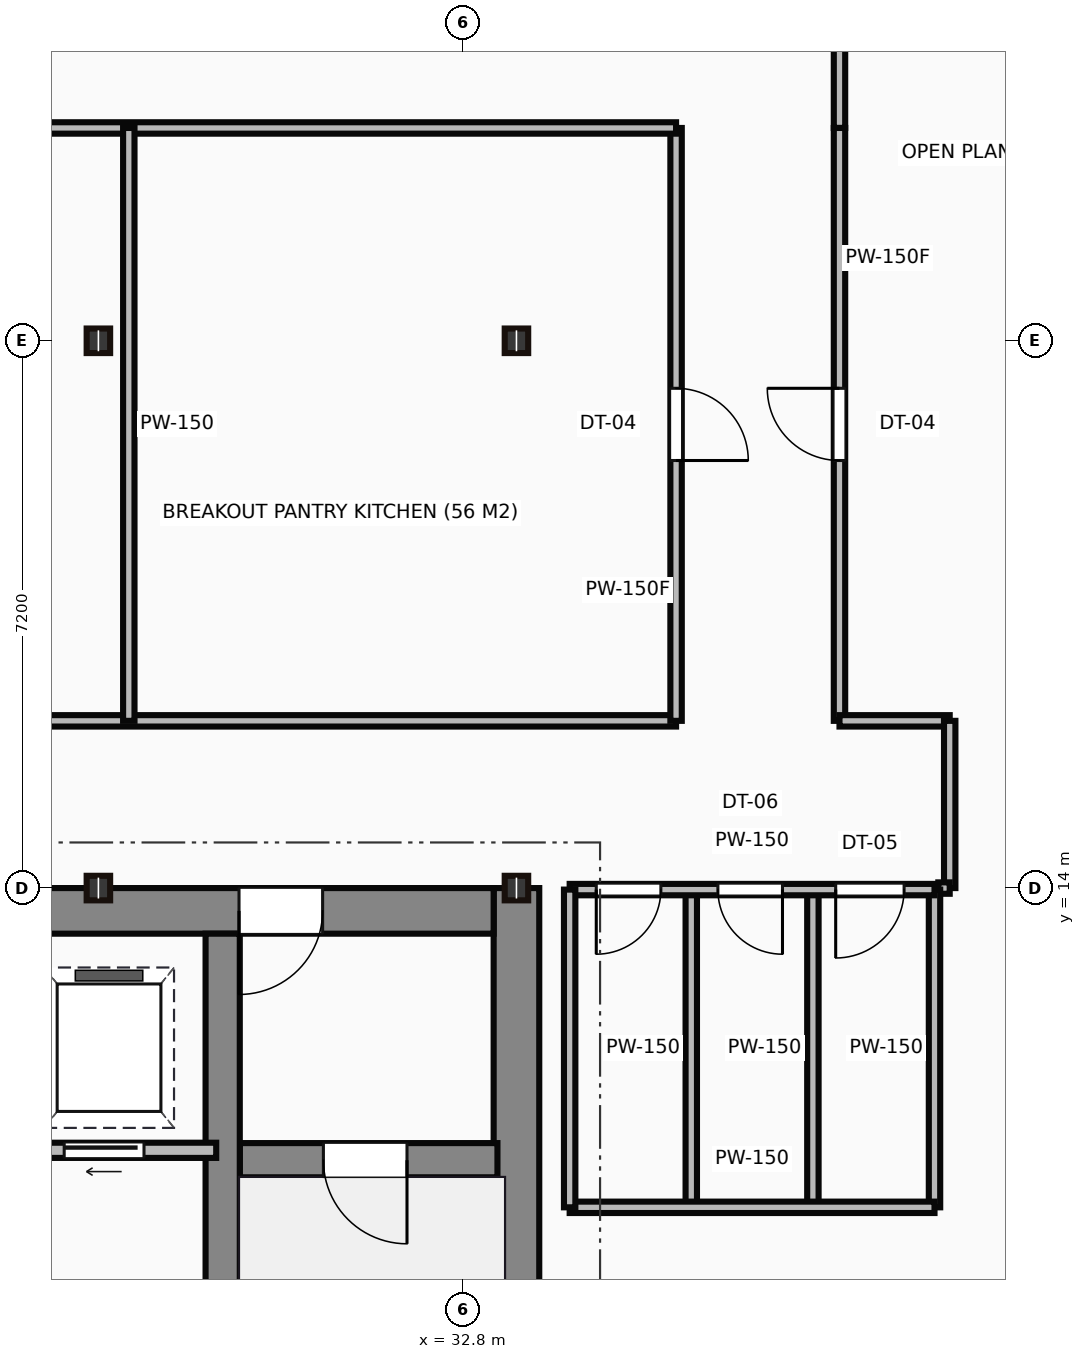
"""IFC4 building model, lengths in metres.
Left out: names, types, materials, properties, quantities, classifications, styles, units other than length and angle.
Written with IfcOpenShell. Run it as: python <this file> out.ifc"""

import sys

from ifc_helpers import new_model, si_unit, direction, frame, frame_2d, origin, origin_2d, place, context, subcontext, project, spatial, rectangle, i_section, extrude, source, transform, mapped, element, fill, save


model = new_model("IFC4")
c1 = context("Model", 3, precision=1e-05, world=origin(), true_north=direction((0.0, 1.0)))
c2 = subcontext(c1, "Body", "Model", "MODEL_VIEW")
j1 = project(units=[si_unit("LENGTHUNIT", "METRE"), si_unit("PLANEANGLEUNIT", "RADIAN")], contexts=[c1])
p1 = place(None, origin())
s1 = spatial("IfcSite", under=j1, at=p1, CompositionType="ELEMENT")
p2 = place(p1, origin())
s2 = spatial("IfcBuilding", under=s1, at=p2, CompositionType="ELEMENT")
p3 = place(p2, frame((0.0, 0.0, 266.1)))
s3 = spatial("IfcBuildingStorey", under=s2, at=p3, CompositionType="ELEMENT", Elevation=266.1)
m1 = source(origin(), c2, "Body", "SweptSolid", [
    extrude(rectangle(XDim=13.1, YDim=0.6, at=frame_2d((6.55, 0.0))), origin(), (0.0, 0.0, 1.0), 3.65),
])
p4 = place(p3, frame((33.5, 0.9, 0.0), z_axis=(0.0, 0.0, 1.0), x_axis=(0.0, 1.0, 0.0)))
e1 = element("IfcWall", 1, at=p4, inside=s3, PredefinedType="SHEAR", context=c2, shape_type="MappedRepresentation", body=[
    mapped(m1, transform((0.0, 0.0, 0.0))),
])
m2 = source(origin(), c2, "Body", "SweptSolid", [
    extrude(rectangle(XDim=12.6, YDim=0.6, at=frame_2d((6.3, 0.0))), origin(), (0.0, 0.0, 1.0), 3.65),
])
p5 = place(p3, frame((20.6, 13.7, 0.0), z_axis=(0.0, 0.0, 1.0), x_axis=(1.0, 0.0, 0.0)))
e2 = element("IfcWall", 2, at=p5, inside=s3, PredefinedType="SHEAR", context=c2, shape_type="MappedRepresentation", body=[
    mapped(m2, transform((0.0, 0.0, 0.0))),
])
p6 = place(p5, frame((9.25, 0.0, 0.0)))
e3 = element("IfcOpeningElement", 3, at=p6, cuts=e2, PredefinedType="OPENING", context=c2, shape_type="SweptSolid", body=[
    extrude(rectangle(XDim=1.1, YDim=2.15, at=frame_2d((0.55, 1.075))), frame((0.0, 0.31, 0.0), z_axis=(0.0, -1.0, 0.0), x_axis=(1.0, 0.0, 0.0)), (0.0, 0.0, 1.0), 0.62),
])
m3 = source(origin(), c2, "Body", "SweptSolid", [
    extrude(rectangle(XDim=12.5, YDim=0.45, at=frame_2d((6.25, 0.0))), origin(), (0.0, 0.0, 1.0), 3.65),
])
p7 = place(p3, frame((29.635, 0.9, 0.0), z_axis=(0.0, 0.0, 1.0), x_axis=(0.0, 1.0, 0.0)))
e4 = element("IfcWall", 4, at=p7, inside=s3, PredefinedType="SHEAR", context=c2, shape_type="MappedRepresentation", body=[
    mapped(m3, transform((0.0, 0.0, 0.0))),
])
m4 = source(origin(), c2, "Body", "SweptSolid", [
    extrude(rectangle(XDim=3.39, YDim=0.45, at=frame_2d((1.695, 0.0))), origin(), (0.0, 0.0, 1.0), 3.65),
])
p8 = place(p3, frame((29.86, 10.42, 0.0), z_axis=(0.0, 0.0, 1.0), x_axis=(1.0, 0.0, 0.0)))
e5 = element("IfcWall", 5, at=p8, inside=s3, PredefinedType="SHEAR", context=c2, shape_type="MappedRepresentation", body=[
    mapped(m4, transform((0.0, 0.0, 0.0))),
])
p9 = place(p8, frame((1.1, 0.0, 0.0)))
e6 = element("IfcOpeningElement", 6, at=p9, cuts=e5, PredefinedType="OPENING", context=c2, shape_type="SweptSolid", body=[
    extrude(rectangle(XDim=1.1, YDim=2.15, at=frame_2d((0.55, 1.075))), frame((0.0, 0.235, 0.0), z_axis=(0.0, -1.0, 0.0), x_axis=(1.0, 0.0, 0.0)), (0.0, 0.0, 1.0), 0.47),
])
m5 = source(origin(), c2, "Body", "SweptSolid", [
    extrude(i_section(OverallWidth=0.309, OverallDepth=0.323, WebThickness=0.014, FlangeThickness=0.023, at=origin_2d()), origin(), (0.0, 0.0, 1.0), 3.65),
])
for number, where, z_axis, x_axis in (
    (7, (28.0, 14.0, 0.0), (0.0, 0.0, 1.0), (1.0, 0.0, 0.0)),
    (8, (28.0, 21.2, 0.0), (0.0, 0.0, 1.0), (1.0, 0.0, 0.0)),
    (9, (33.5, 14.0, 0.0), (0.0, 0.0, 1.0), (1.0, 0.0, 0.0)),
    (10, (33.5, 21.2, 0.0), (0.0, 0.0, 1.0), (1.0, 0.0, 0.0)),
):
    element("IfcColumn", number, at=place(p3, frame(where, z_axis=z_axis, x_axis=x_axis)), inside=s3, PredefinedType="COLUMN", context=c2, shape_type="MappedRepresentation", body=[
        mapped(m5, transform((0.0, 0.0, 0.0))),
    ])
m6 = source(origin(), c2, "Body", "SweptSolid", [
    extrude(rectangle(XDim=8.8, YDim=0.2, at=frame_2d((4.4, 0.0))), origin(), (0.0, 0.0, 1.0), 3.4),
])
p10 = place(p3, frame((20.75, 10.55, 0.0), z_axis=(0.0, 0.0, 1.0), x_axis=(1.0, 0.0, 0.0)))
e11 = element("IfcWall", 11, at=p10, inside=s3, PredefinedType="PARTITIONING", context=c2, shape_type="MappedRepresentation", body=[
    mapped(m6, transform((0.0, 0.0, 0.0))),
])
p11 = place(p10, frame((0.5, 0.0, 0.0)))
e12 = element("IfcOpeningElement", 12, at=p11, cuts=e11, PredefinedType="OPENING", context=c2, shape_type="SweptSolid", body=[
    extrude(rectangle(XDim=1.05, YDim=2.15, at=frame_2d((0.525, 1.075))), frame((0.0, 0.11, 0.0), z_axis=(0.0, -1.0, 0.0), x_axis=(1.0, 0.0, 0.0)), (0.0, 0.0, 1.0), 0.22),
])
p12 = place(p10, frame((2.6, 0.0, 0.0)))
e13 = element("IfcOpeningElement", 13, at=p12, cuts=e11, PredefinedType="OPENING", context=c2, shape_type="SweptSolid", body=[
    extrude(rectangle(XDim=1.05, YDim=2.15, at=frame_2d((0.525, 1.075))), frame((0.0, 0.11, 0.0), z_axis=(0.0, -1.0, 0.0), x_axis=(1.0, 0.0, 0.0)), (0.0, 0.0, 1.0), 0.22),
])
p13 = place(p10, frame((4.7, 0.0, 0.0)))
e14 = element("IfcOpeningElement", 14, at=p13, cuts=e11, PredefinedType="OPENING", context=c2, shape_type="SweptSolid", body=[
    extrude(rectangle(XDim=1.05, YDim=2.15, at=frame_2d((0.525, 1.075))), frame((0.0, 0.11, 0.0), z_axis=(0.0, -1.0, 0.0), x_axis=(1.0, 0.0, 0.0)), (0.0, 0.0, 1.0), 0.22),
])
p14 = place(p10, frame((6.8, 0.0, 0.0)))
e15 = element("IfcOpeningElement", 15, at=p14, cuts=e11, PredefinedType="OPENING", context=c2, shape_type="SweptSolid", body=[
    extrude(rectangle(XDim=1.05, YDim=2.15, at=frame_2d((0.525, 1.075))), frame((0.0, 0.11, 0.0), z_axis=(0.0, -1.0, 0.0), x_axis=(1.0, 0.0, 0.0)), (0.0, 0.0, 1.0), 0.22),
])
m7 = source(origin(), c2, "Body", "SweptSolid", [
    extrude(rectangle(XDim=4.8, YDim=0.15, at=frame_2d((2.4, 0.0))), origin(), (0.0, 0.0, 1.0), 2.787),
])
p15 = place(p3, frame((34.2, 13.98, 0.0), z_axis=(0.0, 0.0, 1.0), x_axis=(1.0, 0.0, 0.0)))
e16 = element("IfcWall", 16, at=p15, inside=s3, PredefinedType="PARTITIONING", context=c2, shape_type="MappedRepresentation", body=[
    mapped(m7, transform((0.0, 0.0, 0.0))),
])
p16 = place(p15, frame((0.35, 0.0, 0.0)))
e17 = element("IfcOpeningElement", 17, at=p16, cuts=e16, PredefinedType="OPENING", context=c2, shape_type="SweptSolid", body=[
    extrude(rectangle(XDim=0.85, YDim=2.1, at=frame_2d((0.425, 1.05))), frame((0.0, 0.085, 0.0), z_axis=(0.0, -1.0, 0.0), x_axis=(1.0, 0.0, 0.0)), (0.0, 0.0, 1.0), 0.17),
])
p17 = place(p15, frame((1.95, 0.0, 0.0)))
e18 = element("IfcOpeningElement", 18, at=p17, cuts=e16, PredefinedType="OPENING", context=c2, shape_type="SweptSolid", body=[
    extrude(rectangle(XDim=0.85, YDim=2.1, at=frame_2d((0.425, 1.05))), frame((0.0, 0.085, 0.0), z_axis=(0.0, -1.0, 0.0), x_axis=(1.0, 0.0, 0.0)), (0.0, 0.0, 1.0), 0.17),
])
p18 = place(p15, frame((3.5, 0.0, 0.0)))
e19 = element("IfcOpeningElement", 19, at=p18, cuts=e16, PredefinedType="OPENING", context=c2, shape_type="SweptSolid", body=[
    extrude(rectangle(XDim=0.9, YDim=2.1, at=frame_2d((0.45, 1.05))), frame((0.0, 0.085, 0.0), z_axis=(0.0, -1.0, 0.0), x_axis=(1.0, 0.0, 0.0)), (0.0, 0.0, 1.0), 0.17),
])
m8 = source(origin(), c2, "Body", "SweptSolid", [
    extrude(rectangle(XDim=4.8, YDim=0.15, at=frame_2d((2.4, 0.0))), origin(), (0.0, 0.0, 1.0), 3.4),
])
p19 = place(p3, frame((34.2, 9.8, 0.0), z_axis=(0.0, 0.0, 1.0), x_axis=(1.0, 0.0, 0.0)))
e20 = element("IfcWall", 20, at=p19, inside=s3, PredefinedType="PARTITIONING", context=c2, shape_type="MappedRepresentation", body=[
    mapped(m8, transform((0.0, 0.0, 0.0))),
])
m9 = source(origin(), c2, "Body", "SweptSolid", [
    extrude(rectangle(XDim=4.18, YDim=0.15, at=frame_2d((2.09, 0.0))), origin(), (0.0, 0.0, 1.0), 3.4),
])
for number, where, z_axis, x_axis in (
    (21, (39.0, 9.8, 0.0), (0.0, 0.0, 1.0), (0.0, 1.0, 0.0)),
    (22, (34.2, 9.8, 0.0), (0.0, 0.0, 1.0), (0.0, 1.0, 0.0)),
    (23, (35.8, 9.8, 0.0), (0.0, 0.0, 1.0), (0.0, 1.0, 0.0)),
    (24, (37.4, 9.8, 0.0), (0.0, 0.0, 1.0), (0.0, 1.0, 0.0)),
):
    element("IfcWall", number, at=place(p3, frame(where, z_axis=z_axis, x_axis=x_axis)), inside=s3, PredefinedType="PARTITIONING", context=c2, shape_type="MappedRepresentation", body=[
        mapped(m9, transform((0.0, 0.0, 0.0))),
    ])
m10 = source(origin(), c2, "Body", "SweptSolid", [
    extrude(rectangle(XDim=2.0, YDim=0.15, at=frame_2d((1.0, 0.0))), origin(), (0.0, 0.0, 1.0), 3.4),
])
p20 = place(p3, frame((37.75, 26.0, 0.0), z_axis=(0.0, 0.0, 1.0), x_axis=(0.0, -1.0, 0.0)))
e25 = element("IfcWall", 25, at=p20, inside=s3, PredefinedType="PARTITIONING", context=c2, shape_type="MappedRepresentation", body=[
    mapped(m10, transform((0.0, 0.0, 0.0))),
])
m11 = source(origin(), c2, "Body", "SweptSolid", [
    extrude(rectangle(XDim=7.8, YDim=0.15, at=frame_2d((3.9, 0.0))), origin(), (0.0, 0.0, 1.0), 3.4),
])
p21 = place(p3, frame((37.75, 24.0, 0.0), z_axis=(0.0, 0.0, 1.0), x_axis=(0.0, -1.0, 0.0)))
e26 = element("IfcWall", 26, at=p21, inside=s3, PredefinedType="PARTITIONING", context=c2, shape_type="MappedRepresentation", body=[
    mapped(m11, transform((0.0, 0.0, 0.0))),
])
p22 = place(p21, frame((3.425, 0.0, 0.0)))
e27 = element("IfcOpeningElement", 27, at=p22, cuts=e26, PredefinedType="OPENING", context=c2, shape_type="SweptSolid", body=[
    extrude(rectangle(XDim=0.95, YDim=2.15, at=frame_2d((0.475, 1.075))), frame((0.0, 0.085, 0.0), z_axis=(0.0, -1.0, 0.0), x_axis=(1.0, 0.0, 0.0)), (0.0, 0.0, 1.0), 0.17),
])
m12 = source(origin(), c2, "Body", "SweptSolid", [
    extrude(rectangle(XDim=1.45, YDim=0.15, at=frame_2d((0.725, 0.0))), origin(), (0.0, 0.0, 1.0), 3.4),
])
p23 = place(p3, frame((37.75, 16.2, 0.0), z_axis=(0.0, 0.0, 1.0), x_axis=(1.0, 0.0, 0.0)))
e28 = element("IfcWall", 28, at=p23, inside=s3, PredefinedType="PARTITIONING", context=c2, shape_type="MappedRepresentation", body=[
    mapped(m12, transform((0.0, 0.0, 0.0))),
])
m13 = source(origin(), c2, "Body", "SweptSolid", [
    extrude(rectangle(XDim=2.2, YDim=0.15, at=frame_2d((1.1, 0.0))), origin(), (0.0, 0.0, 1.0), 3.4),
])
p24 = place(p3, frame((39.2, 16.2, 0.0), z_axis=(0.0, 0.0, 1.0), x_axis=(0.0, -1.0, 0.0)))
e29 = element("IfcWall", 29, at=p24, inside=s3, PredefinedType="PARTITIONING", context=c2, shape_type="MappedRepresentation", body=[
    mapped(m13, transform((0.0, 0.0, 0.0))),
])
m14 = source(origin(), c2, "Body", "SweptSolid", [
    extrude(rectangle(XDim=0.15, YDim=0.15, at=frame_2d((0.075, 0.0))), origin(), (0.0, 0.0, 1.0), 3.4),
])
p25 = place(p3, frame((39.2, 14.0, 0.0), z_axis=(0.0, 0.0, 1.0), x_axis=(-1.0, 0.0, 0.0)))
e30 = element("IfcWall", 30, at=p25, inside=s3, PredefinedType="PARTITIONING", context=c2, shape_type="MappedRepresentation", body=[
    mapped(m14, transform((0.0, 0.0, 0.0))),
])
m15 = source(origin(), c2, "Body", "SweptSolid", [
    extrude(rectangle(XDim=23.65, YDim=0.15, at=frame_2d((11.825, 0.0))), origin(), (0.0, 0.0, 1.0), 3.4),
])
p26 = place(p3, frame((11.95, 16.2, 0.0), z_axis=(0.0, 0.0, 1.0), x_axis=(1.0, 0.0, 0.0)))
e31 = element("IfcWall", 31, at=p26, inside=s3, PredefinedType="PARTITIONING", context=c2, shape_type="MappedRepresentation", body=[
    mapped(m15, transform((0.0, 0.0, 0.0))),
])
p27 = place(p26, frame((7.88, 0.0, 0.0)))
e32 = element("IfcOpeningElement", 32, at=p27, cuts=e31, PredefinedType="OPENING", context=c2, shape_type="SweptSolid", body=[
    extrude(rectangle(XDim=0.95, YDim=2.15, at=frame_2d((0.475, 1.075))), frame((0.0, 0.085, 0.0), z_axis=(0.0, -1.0, 0.0), x_axis=(1.0, 0.0, 0.0)), (0.0, 0.0, 1.0), 0.17),
])
p28 = place(p3, frame((35.6, 16.2, 0.0), z_axis=(0.0, 0.0, 1.0), x_axis=(0.0, 1.0, 0.0)))
e33 = element("IfcWall", 33, at=p28, inside=s3, PredefinedType="PARTITIONING", context=c2, shape_type="MappedRepresentation", body=[
    mapped(m11, transform((0.0, 0.0, 0.0))),
])
p29 = place(p28, frame((3.425, 0.0, 0.0)))
e34 = element("IfcOpeningElement", 34, at=p29, cuts=e33, PredefinedType="OPENING", context=c2, shape_type="SweptSolid", body=[
    extrude(rectangle(XDim=0.95, YDim=2.15, at=frame_2d((0.475, 1.075))), frame((0.0, 0.085, 0.0), z_axis=(0.0, -1.0, 0.0), x_axis=(1.0, 0.0, 0.0)), (0.0, 0.0, 1.0), 0.17),
])
p30 = place(p3, frame((35.6, 24.0, 0.0), z_axis=(0.0, 0.0, 1.0), x_axis=(-1.0, 0.0, 0.0)))
e35 = element("IfcWall", 35, at=p30, inside=s3, PredefinedType="PARTITIONING", context=c2, shape_type="MappedRepresentation", body=[
    mapped(m15, transform((0.0, 0.0, 0.0))),
])
p31 = place(p3, frame((28.4, 24.0, 0.0), z_axis=(0.0, 0.0, 1.0), x_axis=(0.0, -1.0, 0.0)))
e36 = element("IfcWall", 36, at=p31, inside=s3, PredefinedType="PARTITIONING", context=c2, shape_type="MappedRepresentation", body=[
    mapped(m11, transform((0.0, 0.0, 0.0))),
])
m16 = source(origin(), c2, "Body", "SweptSolid", [
    extrude(rectangle(XDim=1.1, YDim=2.15, at=frame_2d((0.55, 1.075))), frame((0.0, 0.025, 0.0), z_axis=(0.0, -1.0, 0.0), x_axis=(1.0, 0.0, 0.0)), (0.0, 0.0, 1.0), 0.05),
])
p32 = place(p9, frame((1.1, 0.0, 0.0), z_axis=(0.0, 0.0, 1.0), x_axis=(-1.0, 0.0, 0.0)))
e37 = element("IfcDoor", 37, at=p32, inside=s3, OperationType="SINGLE_SWING_RIGHT", PredefinedType="DOOR", context=c2, shape_type="MappedRepresentation", body=[
    mapped(m16, transform((0.0, 0.0, 0.0))),
])
fill(e6, e37)
p33 = place(p6, origin())
e38 = element("IfcDoor", 38, at=p33, inside=s3, OperationType="SINGLE_SWING_LEFT", PredefinedType="DOOR", context=c2, shape_type="MappedRepresentation", body=[
    mapped(m16, transform((0.0, 0.0, 0.0))),
])
fill(e3, e38)
m17 = source(origin(), c2, "Body", "SweptSolid", [
    extrude(rectangle(XDim=1.05, YDim=2.15, at=frame_2d((0.525, 1.075))), frame((0.0, 0.025, 0.0), z_axis=(0.0, -1.0, 0.0), x_axis=(1.0, 0.0, 0.0)), (0.0, 0.0, 1.0), 0.05),
])
p34 = place(p14, frame((1.05, 0.0, 0.0), z_axis=(0.0, 0.0, 1.0), x_axis=(-1.0, 0.0, 0.0)))
e39 = element("IfcDoor", 39, at=p34, inside=s3, OperationType="SLIDING_TO_LEFT", PredefinedType="DOOR", context=c2, shape_type="MappedRepresentation", body=[
    mapped(m17, transform((0.0, 0.0, 0.0))),
])
fill(e15, e39)
m18 = source(origin(), c2, "Body", "SweptSolid", [
    extrude(rectangle(XDim=0.85, YDim=2.1, at=frame_2d((0.425, 1.05))), frame((0.0, 0.025, 0.0), z_axis=(0.0, -1.0, 0.0), x_axis=(1.0, 0.0, 0.0)), (0.0, 0.0, 1.0), 0.05),
])
p35 = place(p16, frame((0.85, 0.0, 0.0), z_axis=(0.0, 0.0, 1.0), x_axis=(-1.0, 0.0, 0.0)))
e40 = element("IfcDoor", 40, at=p35, inside=s3, OperationType="SINGLE_SWING_LEFT", PredefinedType="DOOR", context=c2, shape_type="MappedRepresentation", body=[
    mapped(m18, transform((0.0, 0.0, 0.0))),
])
fill(e17, e40)
p36 = place(p17, frame((0.85, 0.0, 0.0), z_axis=(0.0, 0.0, 1.0), x_axis=(-1.0, 0.0, 0.0)))
e41 = element("IfcDoor", 41, at=p36, inside=s3, OperationType="SINGLE_SWING_RIGHT", PredefinedType="DOOR", context=c2, shape_type="MappedRepresentation", body=[
    mapped(m18, transform((0.0, 0.0, 0.0))),
])
fill(e18, e41)
m19 = source(origin(), c2, "Body", "SweptSolid", [
    extrude(rectangle(XDim=0.9, YDim=2.1, at=frame_2d((0.45, 1.05))), frame((0.0, 0.025, 0.0), z_axis=(0.0, -1.0, 0.0), x_axis=(1.0, 0.0, 0.0)), (0.0, 0.0, 1.0), 0.05),
])
p37 = place(p18, frame((0.9, 0.0, 0.0), z_axis=(0.0, 0.0, 1.0), x_axis=(-1.0, 0.0, 0.0)))
e42 = element("IfcDoor", 42, at=p37, inside=s3, OperationType="SINGLE_SWING_LEFT", PredefinedType="DOOR", context=c2, shape_type="MappedRepresentation", body=[
    mapped(m19, transform((0.0, 0.0, 0.0))),
])
fill(e19, e42)
m20 = source(origin(), c2, "Body", "SweptSolid", [
    extrude(rectangle(XDim=0.95, YDim=2.15, at=frame_2d((0.475, 1.075))), frame((0.0, 0.025, 0.0), z_axis=(0.0, -1.0, 0.0), x_axis=(1.0, 0.0, 0.0)), (0.0, 0.0, 1.0), 0.05),
])
p38 = place(p29, origin())
e43 = element("IfcDoor", 43, at=p38, inside=s3, OperationType="SINGLE_SWING_LEFT", PredefinedType="DOOR", context=c2, shape_type="MappedRepresentation", body=[
    mapped(m20, transform((0.0, 0.0, 0.0))),
])
fill(e34, e43)
p39 = place(p22, origin())
e44 = element("IfcDoor", 44, at=p39, inside=s3, OperationType="SINGLE_SWING_LEFT", PredefinedType="DOOR", context=c2, shape_type="MappedRepresentation", body=[
    mapped(m20, transform((0.0, 0.0, 0.0))),
])
fill(e27, e44)
save(model, sys.argv[1])
